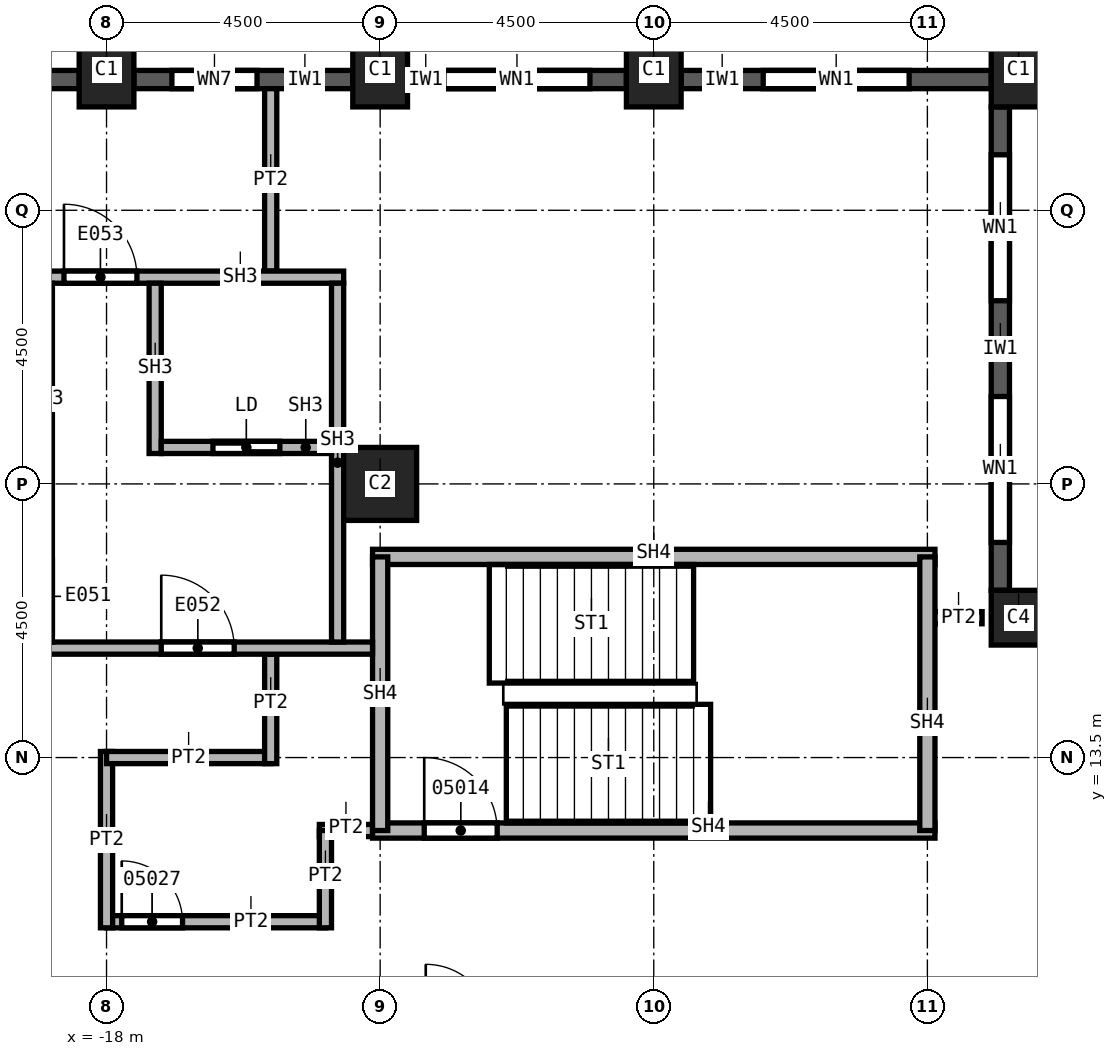
"""IFC4 building model, lengths in metres.
Left out: names, types, materials, properties, quantities, classifications, styles, units other than length and angle.
Written with IfcOpenShell. Run it as: python <this file> out.ifc"""

import sys

from ifc_helpers import new_model, si_unit, direction, frame, frame_2d, origin, origin_2d, place, context, subcontext, project, spatial, rectangle, extrude, element, fill, save


model = new_model("IFC4")
c1 = context("Model", 3, precision=1e-05, world=origin(), true_north=direction((0.0, 1.0)))
c2 = subcontext(c1, "Body", "Model", "MODEL_VIEW")
j1 = project(units=[si_unit("LENGTHUNIT", "METRE"), si_unit("PLANEANGLEUNIT", "RADIAN")], contexts=[c1])
p1 = place(None, origin())
s1 = spatial("IfcSite", under=j1, at=p1, CompositionType="ELEMENT")
p2 = place(p1, origin())
s2 = spatial("IfcBuilding", under=s1, at=p2, CompositionType="ELEMENT")
p3 = place(p2, frame((0.0, 0.0, 112.0)))
s3 = spatial("IfcBuildingStorey", under=s2, at=p3, CompositionType="ELEMENT", Elevation=112.0)
p4 = place(p3, frame((-13.5, 18.0, 0.0), z_axis=(0.0, 0.0, 1.0), x_axis=(1.0, 0.0, 0.0)))
e1 = element("IfcColumn", 1, at=p4, inside=s3, PredefinedType="COLUMN", context=c2, shape_type="SweptSolid", body=[
    extrude(rectangle(XDim=1.2, YDim=1.2, at=origin_2d()), origin(), (0.0, 0.0, 1.0), 3.7),
])
for number, where, z_axis, x_axis in (
    (2, (-3.0, 24.8, 0.0), (0.0, 0.0, 1.0), (1.0, 0.0, 0.0)),
    (3, (-9.0, 24.8, 0.0), (0.0, 0.0, 1.0), (1.0, 0.0, 0.0)),
    (4, (-13.5, 24.8, 0.0), (0.0, 0.0, 1.0), (1.0, 0.0, 0.0)),
    (5, (-18.0, 24.8, 0.0), (0.0, 0.0, 1.0), (1.0, 0.0, 0.0)),
):
    element("IfcColumn", number, at=place(p3, frame(where, z_axis=z_axis, x_axis=x_axis)), inside=s3, PredefinedType="COLUMN", context=c2, shape_type="SweptSolid", body=[
        extrude(rectangle(XDim=0.9, YDim=1.2, at=origin_2d()), origin(), (0.0, 0.0, 1.0), 3.7),
    ])
p5 = place(p3, frame((-3.0, 15.8, 0.0), z_axis=(0.0, 0.0, 1.0), x_axis=(1.0, 0.0, 0.0)))
e6 = element("IfcColumn", 6, at=p5, inside=s3, PredefinedType="COLUMN", context=c2, shape_type="SweptSolid", body=[
    extrude(rectangle(XDim=0.9, YDim=0.9, at=origin_2d()), origin(), (0.0, 0.0, 1.0), 3.7),
])
p6 = place(p3, frame((-3.3, 16.25, 0.0), z_axis=(0.0, 0.0, 1.0), x_axis=(0.0, 1.0, 0.0)))
e7 = element("IfcWall", 7, at=p6, inside=s3, PredefinedType="SOLIDWALL", context=c2, shape_type="SweptSolid", body=[
    extrude(rectangle(XDim=7.95, YDim=0.3, at=frame_2d((3.975, 0.0))), origin(), (0.0, 0.0, 1.0), 3.1),
])
p7 = place(p6, frame((0.788, 0.0, 0.8)))
e8 = element("IfcOpeningElement", 8, at=p7, cuts=e7, PredefinedType="OPENING", context=c2, shape_type="SweptSolid", body=[
    extrude(rectangle(XDim=2.4, YDim=1.95, at=frame_2d((1.2, 0.975))), frame((0.0, 0.15, 0.0), z_axis=(0.0, -1.0, 0.0), x_axis=(1.0, 0.0, 0.0)), (0.0, 0.0, 1.0), 0.3),
])
p8 = place(p6, frame((4.762, 0.0, 0.8)))
e9 = element("IfcOpeningElement", 9, at=p8, cuts=e7, PredefinedType="OPENING", context=c2, shape_type="SweptSolid", body=[
    extrude(rectangle(XDim=2.4, YDim=1.95, at=frame_2d((1.2, 0.975))), frame((0.0, 0.15, 0.0), z_axis=(0.0, -1.0, 0.0), x_axis=(1.0, 0.0, 0.0)), (0.0, 0.0, 1.0), 0.3),
])
p9 = place(p3, frame((-3.45, 24.65, 0.0), z_axis=(0.0, 0.0, 1.0), x_axis=(-1.0, 0.0, 0.0)))
e10 = element("IfcWall", 10, at=p9, inside=s3, PredefinedType="SOLIDWALL", context=c2, shape_type="SweptSolid", body=[
    extrude(rectangle(XDim=5.1, YDim=0.3, at=frame_2d((2.55, 0.0))), origin(), (0.0, 0.0, 1.0), 3.1),
])
p10 = place(p9, frame((1.35, 0.0, 0.8)))
e11 = element("IfcOpeningElement", 11, at=p10, cuts=e10, PredefinedType="OPENING", context=c2, shape_type="SweptSolid", body=[
    extrude(rectangle(XDim=2.4, YDim=1.95, at=frame_2d((1.2, 0.975))), frame((0.0, 0.15, 0.0), z_axis=(0.0, -1.0, 0.0), x_axis=(1.0, 0.0, 0.0)), (0.0, 0.0, 1.0), 0.3),
])
p11 = place(p3, frame((-9.45, 24.65, 0.0), z_axis=(0.0, 0.0, 1.0), x_axis=(-1.0, 0.0, 0.0)))
e12 = element("IfcWall", 12, at=p11, inside=s3, PredefinedType="SOLIDWALL", context=c2, shape_type="SweptSolid", body=[
    extrude(rectangle(XDim=3.6, YDim=0.3, at=frame_2d((1.8, 0.0))), origin(), (0.0, 0.0, 1.0), 3.1),
])
p12 = place(p11, frame((0.6, 0.0, 0.8)))
e13 = element("IfcOpeningElement", 13, at=p12, cuts=e12, PredefinedType="OPENING", context=c2, shape_type="SweptSolid", body=[
    extrude(rectangle(XDim=2.4, YDim=1.95, at=frame_2d((1.2, 0.975))), frame((0.0, 0.15, 0.0), z_axis=(0.0, -1.0, 0.0), x_axis=(1.0, 0.0, 0.0)), (0.0, 0.0, 1.0), 0.3),
])
p13 = place(p3, frame((-13.95, 24.65, 0.0), z_axis=(0.0, 0.0, 1.0), x_axis=(-1.0, 0.0, 0.0)))
e14 = element("IfcWall", 14, at=p13, inside=s3, PredefinedType="SOLIDWALL", context=c2, shape_type="SweptSolid", body=[
    extrude(rectangle(XDim=3.6, YDim=0.3, at=frame_2d((1.8, 0.0))), origin(), (0.0, 0.0, 1.0), 3.1),
])
p14 = place(p13, frame((1.575, 0.0, 0.8)))
e15 = element("IfcOpeningElement", 15, at=p14, cuts=e14, PredefinedType="OPENING", context=c2, shape_type="SweptSolid", body=[
    extrude(rectangle(XDim=1.4, YDim=1.95, at=frame_2d((0.7, 0.975))), frame((0.0, 0.15, 0.0), z_axis=(0.0, -1.0, 0.0), x_axis=(1.0, 0.0, 0.0)), (0.0, 0.0, 1.0), 0.3),
])
p15 = place(p3, frame((-18.45, 24.65, 0.0), z_axis=(0.0, 0.0, 1.0), x_axis=(-1.0, 0.0, 0.0)))
e16 = element("IfcWall", 16, at=p15, inside=s3, PredefinedType="SOLIDWALL", context=c2, shape_type="SweptSolid", body=[
    extrude(rectangle(XDim=3.6, YDim=0.3, at=frame_2d((1.8, 0.0))), origin(), (0.0, 0.0, 1.0), 3.1),
])
p16 = place(p15, frame((0.6, 0.0, 0.8)))
e17 = element("IfcOpeningElement", 17, at=p16, cuts=e16, PredefinedType="OPENING", context=c2, shape_type="SweptSolid", body=[
    extrude(rectangle(XDim=2.4, YDim=1.95, at=frame_2d((1.2, 0.975))), frame((0.0, 0.15, 0.0), z_axis=(0.0, -1.0, 0.0), x_axis=(1.0, 0.0, 0.0)), (0.0, 0.0, 1.0), 0.3),
])
p17 = place(p3, frame((-18.0, 10.8, 0.0), z_axis=(0.0, 0.0, 1.0), x_axis=(1.0, 0.0, 0.0)))
e18 = element("IfcWall", 18, at=p17, inside=s3, PredefinedType="PARTITIONING", context=c2, shape_type="SweptSolid", body=[
    extrude(rectangle(XDim=3.6, YDim=0.2, at=frame_2d((1.8, 0.0))), origin(), (0.0, 0.0, 1.0), 3.7),
])
p18 = place(p17, frame((0.25, 0.0, 0.0)))
e19 = element("IfcOpeningElement", 19, at=p18, cuts=e18, PredefinedType="OPENING", context=c2, shape_type="SweptSolid", body=[
    extrude(rectangle(XDim=1.0, YDim=2.1, at=frame_2d((0.5, 1.05))), frame((0.0, 0.1, 0.0), z_axis=(0.0, -1.0, 0.0), x_axis=(1.0, 0.0, 0.0)), (0.0, 0.0, 1.0), 0.2),
])
p19 = place(p3, frame((-18.0, 13.6, 0.0), z_axis=(0.0, 0.0, 1.0), x_axis=(0.0, -1.0, 0.0)))
e20 = element("IfcWall", 20, at=p19, inside=s3, PredefinedType="PARTITIONING", context=c2, shape_type="SweptSolid", body=[
    extrude(rectangle(XDim=2.9, YDim=0.2, at=frame_2d((1.45, 0.0))), origin(), (0.0, 0.0, 1.0), 3.7),
])
p20 = place(p3, frame((-15.3, 13.5, 0.0), z_axis=(0.0, 0.0, 1.0), x_axis=(-1.0, 0.0, 0.0)))
e21 = element("IfcWall", 21, at=p20, inside=s3, PredefinedType="PARTITIONING", context=c2, shape_type="SweptSolid", body=[
    extrude(rectangle(XDim=2.7, YDim=0.2, at=frame_2d((1.35, 0.0))), origin(), (0.0, 0.0, 1.0), 3.7),
])
p21 = place(p3, frame((-15.3, 15.2, 0.0), z_axis=(0.0, 0.0, 1.0), x_axis=(0.0, -1.0, 0.0)))
e22 = element("IfcWall", 22, at=p21, inside=s3, PredefinedType="PARTITIONING", context=c2, shape_type="SweptSolid", body=[
    extrude(rectangle(XDim=1.8, YDim=0.2, at=frame_2d((0.9, 0.0))), origin(), (0.0, 0.0, 1.0), 3.7),
])
p22 = place(p3, frame((-15.3, 24.5, 0.0), z_axis=(0.0, 0.0, 1.0), x_axis=(0.0, -1.0, 0.0)))
e23 = element("IfcWall", 23, at=p22, inside=s3, PredefinedType="PARTITIONING", context=c2, shape_type="SweptSolid", body=[
    extrude(rectangle(XDim=3.0, YDim=0.2, at=frame_2d((1.5, 0.0))), origin(), (0.0, 0.0, 1.0), 3.7),
])
p23 = place(p3, frame((-14.5, 12.3, 0.0), z_axis=(0.0, 0.0, 1.0), x_axis=(1.0, 0.0, 0.0)))
e24 = element("IfcWall", 24, at=p23, inside=s3, PredefinedType="PARTITIONING", context=c2, shape_type="SweptSolid", body=[
    extrude(rectangle(XDim=1.125, YDim=0.2, at=frame_2d((0.562, 0.0))), origin(), (0.0, 0.0, 1.0), 3.7),
])
p24 = place(p3, frame((-14.4, 10.7, 0.0), z_axis=(0.0, 0.0, 1.0), x_axis=(0.0, 1.0, 0.0)))
e25 = element("IfcWall", 25, at=p24, inside=s3, PredefinedType="PARTITIONING", context=c2, shape_type="SweptSolid", body=[
    extrude(rectangle(XDim=1.6, YDim=0.2, at=frame_2d((0.8, 0.0))), origin(), (0.0, 0.0, 1.0), 3.7),
])
p25 = place(p3, frame((-4.5, 15.8, 0.0), z_axis=(0.0, 0.0, 1.0), x_axis=(1.0, 0.0, 0.0)))
e26 = element("IfcWall", 26, at=p25, inside=s3, PredefinedType="PARTITIONING", context=c2, shape_type="SweptSolid", body=[
    extrude(rectangle(XDim=0.9, YDim=0.2, at=frame_2d((0.45, 0.0))), origin(), (0.0, 0.0, 1.0), 3.7),
])
p26 = place(p3, frame((-13.625, 12.3, 0.0), z_axis=(0.0, 0.0, 1.0), x_axis=(1.0, 0.0, 0.0)))
e27 = element("IfcWall", 27, at=p26, inside=s3, PredefinedType="SOLIDWALL", context=c2, shape_type="SweptSolid", body=[
    extrude(rectangle(XDim=9.25, YDim=0.25, at=frame_2d((4.625, 0.0))), origin(), (0.0, 0.0, 1.0), 3.7),
])
p27 = place(p26, frame((0.85, 0.0, 0.0)))
e28 = element("IfcOpeningElement", 28, at=p27, cuts=e27, PredefinedType="OPENING", context=c2, shape_type="SweptSolid", body=[
    extrude(rectangle(XDim=1.2, YDim=2.1, at=frame_2d((0.6, 1.05))), frame((0.0, 0.125, 0.0), z_axis=(0.0, -1.0, 0.0), x_axis=(1.0, 0.0, 0.0)), (0.0, 0.0, 1.0), 0.25),
])
p28 = place(p3, frame((-13.625, 16.8, 0.0), z_axis=(0.0, 0.0, 1.0), x_axis=(1.0, 0.0, 0.0)))
e29 = element("IfcWall", 29, at=p28, inside=s3, PredefinedType="SOLIDWALL", context=c2, shape_type="SweptSolid", body=[
    extrude(rectangle(XDim=9.25, YDim=0.25, at=frame_2d((4.625, 0.0))), origin(), (0.0, 0.0, 1.0), 3.7),
])
for number, where, z_axis, x_axis in (
    (30, (-13.5, 12.3, 0.0), (0.0, 0.0, 1.0), (0.0, 1.0, 0.0)),
    (31, (-4.5, 16.8, 0.0), (0.0, 0.0, 1.0), (0.0, -1.0, 0.0)),
):
    element("IfcWall", number, at=place(p3, frame(where, z_axis=z_axis, x_axis=x_axis)), inside=s3, PredefinedType="SOLIDWALL", context=c2, shape_type="SweptSolid", body=[
        extrude(rectangle(XDim=4.5, YDim=0.25, at=frame_2d((2.25, 0.0))), origin(), (0.0, 0.0, 1.0), 3.7),
    ])
p29 = place(p3, frame((-21.9, 15.3, 0.0), z_axis=(0.0, 0.0, 1.0), x_axis=(1.0, 0.0, 0.0)))
e32 = element("IfcWall", 32, at=p29, inside=s3, PredefinedType="SOLIDWALL", context=c2, shape_type="SweptSolid", body=[
    extrude(rectangle(XDim=8.275, YDim=0.2, at=frame_2d((4.137, 0.0))), origin(), (0.0, 0.0, 1.0), 3.7),
])
p30 = place(p29, frame((4.8, 0.0, 0.0)))
e33 = element("IfcOpeningElement", 33, at=p30, cuts=e32, PredefinedType="OPENING", context=c2, shape_type="SweptSolid", body=[
    extrude(rectangle(XDim=1.2, YDim=2.1, at=frame_2d((0.6, 1.05))), frame((0.0, 0.1, 0.0), z_axis=(0.0, -1.0, 0.0), x_axis=(1.0, 0.0, 0.0)), (0.0, 0.0, 1.0), 0.2),
])
p31 = place(p3, frame((-21.9, 21.4, 0.0), z_axis=(0.0, 0.0, 1.0), x_axis=(1.0, 0.0, 0.0)))
e34 = element("IfcWall", 34, at=p31, inside=s3, PredefinedType="SOLIDWALL", context=c2, shape_type="SweptSolid", body=[
    extrude(rectangle(XDim=7.8, YDim=0.2, at=frame_2d((3.9, 0.0))), origin(), (0.0, 0.0, 1.0), 3.7),
])
p32 = place(p31, frame((3.2, 0.0, 0.0)))
e35 = element("IfcOpeningElement", 35, at=p32, cuts=e34, PredefinedType="OPENING", context=c2, shape_type="SweptSolid", body=[
    extrude(rectangle(XDim=1.2, YDim=2.1, at=frame_2d((0.6, 1.05))), frame((0.0, 0.1, 0.0), z_axis=(0.0, -1.0, 0.0), x_axis=(1.0, 0.0, 0.0)), (0.0, 0.0, 1.0), 0.2),
])
p33 = place(p3, frame((-14.2, 15.4, 0.0), z_axis=(0.0, 0.0, 1.0), x_axis=(0.0, 1.0, 0.0)))
e36 = element("IfcWall", 36, at=p33, inside=s3, PredefinedType="SOLIDWALL", context=c2, shape_type="SweptSolid", body=[
    extrude(rectangle(XDim=5.9, YDim=0.2, at=frame_2d((2.95, 0.0))), origin(), (0.0, 0.0, 1.0), 3.7),
])
p34 = place(p3, frame((-18.99, 15.4, 0.0), z_axis=(0.0, 0.0, 1.0), x_axis=(0.0, 1.0, 0.0)))
e37 = element("IfcWall", 37, at=p34, inside=s3, PredefinedType="SOLIDWALL", context=c2, shape_type="SweptSolid", body=[
    extrude(rectangle(XDim=5.9, YDim=0.2, at=frame_2d((2.95, 0.0))), origin(), (0.0, 0.0, 1.0), 3.7),
])
p35 = place(p34, frame((0.15, 0.0, 0.0)))
e38 = element("IfcOpeningElement", 38, at=p35, cuts=e37, PredefinedType="OPENING", context=c2, shape_type="SweptSolid", body=[
    extrude(rectangle(XDim=1.2, YDim=2.1, at=frame_2d((0.6, 1.05))), frame((0.0, 0.1, 0.0), z_axis=(0.0, -1.0, 0.0), x_axis=(1.0, 0.0, 0.0)), (0.0, 0.0, 1.0), 0.2),
])
p36 = place(p3, frame((-17.2, 18.5, 0.0), z_axis=(0.0, 0.0, 1.0), x_axis=(0.0, 1.0, 0.0)))
e39 = element("IfcWall", 39, at=p36, inside=s3, PredefinedType="SOLIDWALL", context=c2, shape_type="SweptSolid", body=[
    extrude(rectangle(XDim=2.8, YDim=0.2, at=frame_2d((1.4, 0.0))), origin(), (0.0, 0.0, 1.0), 3.7),
])
p37 = place(p3, frame((-17.1, 18.6, 0.0), z_axis=(0.0, 0.0, 1.0), x_axis=(1.0, 0.0, 0.0)))
e40 = element("IfcWall", 40, at=p37, inside=s3, PredefinedType="SOLIDWALL", context=c2, shape_type="SweptSolid", body=[
    extrude(rectangle(XDim=2.8, YDim=0.2, at=frame_2d((1.4, 0.0))), origin(), (0.0, 0.0, 1.0), 3.7),
])
p38 = place(p37, frame((0.85, 0.0, 0.0)))
e41 = element("IfcOpeningElement", 41, at=p38, cuts=e40, PredefinedType="OPENING", context=c2, shape_type="SweptSolid", body=[
    extrude(rectangle(XDim=1.1, YDim=2.1, at=frame_2d((0.55, 1.05))), frame((0.0, 0.1, 0.0), z_axis=(0.0, -1.0, 0.0), x_axis=(1.0, 0.0, 0.0)), (0.0, 0.0, 1.0), 0.2),
])
p39 = place(p7, origin())
e42 = element("IfcWindow", 42, at=p39, inside=s3, PartitioningType="SINGLE_PANEL", PredefinedType="WINDOW", context=c2, shape_type="SweptSolid", body=[
    extrude(rectangle(XDim=2.4, YDim=1.95, at=frame_2d((1.2, 0.975))), frame((0.0, 0.03, 0.0), z_axis=(0.0, -1.0, 0.0), x_axis=(1.0, 0.0, 0.0)), (0.0, 0.0, 1.0), 0.06),
])
fill(e8, e42)
p40 = place(p8, origin())
e43 = element("IfcWindow", 43, at=p40, inside=s3, PartitioningType="SINGLE_PANEL", PredefinedType="WINDOW", context=c2, shape_type="SweptSolid", body=[
    extrude(rectangle(XDim=2.4, YDim=1.95, at=frame_2d((1.2, 0.975))), frame((0.0, 0.03, 0.0), z_axis=(0.0, -1.0, 0.0), x_axis=(1.0, 0.0, 0.0)), (0.0, 0.0, 1.0), 0.06),
])
fill(e9, e43)
p41 = place(p10, origin())
e44 = element("IfcWindow", 44, at=p41, inside=s3, PartitioningType="SINGLE_PANEL", PredefinedType="WINDOW", context=c2, shape_type="SweptSolid", body=[
    extrude(rectangle(XDim=2.4, YDim=1.95, at=frame_2d((1.2, 0.975))), frame((0.0, 0.03, 0.0), z_axis=(0.0, -1.0, 0.0), x_axis=(1.0, 0.0, 0.0)), (0.0, 0.0, 1.0), 0.06),
])
fill(e11, e44)
p42 = place(p12, origin())
e45 = element("IfcWindow", 45, at=p42, inside=s3, PartitioningType="SINGLE_PANEL", PredefinedType="WINDOW", context=c2, shape_type="SweptSolid", body=[
    extrude(rectangle(XDim=2.4, YDim=1.95, at=frame_2d((1.2, 0.975))), frame((0.0, 0.03, 0.0), z_axis=(0.0, -1.0, 0.0), x_axis=(1.0, 0.0, 0.0)), (0.0, 0.0, 1.0), 0.06),
])
fill(e13, e45)
p43 = place(p27, origin())
e46 = element("IfcDoor", 46, at=p43, inside=s3, OperationType="SINGLE_SWING_LEFT", PredefinedType="DOOR", context=c2, shape_type="SweptSolid", body=[
    extrude(rectangle(XDim=1.2, YDim=2.1, at=frame_2d((0.6, 1.05))), frame((0.0, 0.025, 0.0), z_axis=(0.0, -1.0, 0.0), x_axis=(1.0, 0.0, 0.0)), (0.0, 0.0, 1.0), 0.05),
])
fill(e28, e46)
p44 = place(p18, origin())
e47 = element("IfcDoor", 47, at=p44, inside=s3, OperationType="SINGLE_SWING_RIGHT", PredefinedType="DOOR", context=c2, shape_type="SweptSolid", body=[
    extrude(rectangle(XDim=1.0, YDim=2.1, at=frame_2d((0.5, 1.05))), frame((0.0, 0.025, 0.0), z_axis=(0.0, -1.0, 0.0), x_axis=(1.0, 0.0, 0.0)), (0.0, 0.0, 1.0), 0.05),
])
fill(e19, e47)
p45 = place(p38, origin())
e48 = element("IfcDoor", 48, at=p45, inside=s3, OperationType="SLIDING_TO_LEFT", PredefinedType="DOOR", context=c2, shape_type="SweptSolid", body=[
    extrude(rectangle(XDim=1.1, YDim=2.1, at=frame_2d((0.55, 1.05))), frame((0.0, 0.025, 0.0), z_axis=(0.0, -1.0, 0.0), x_axis=(1.0, 0.0, 0.0)), (0.0, 0.0, 1.0), 0.05),
])
fill(e41, e48)
p46 = place(p30, origin())
e49 = element("IfcDoor", 49, at=p46, inside=s3, OperationType="SINGLE_SWING_RIGHT", PredefinedType="DOOR", context=c2, shape_type="SweptSolid", body=[
    extrude(rectangle(XDim=1.2, YDim=2.1, at=frame_2d((0.6, 1.05))), frame((0.0, 0.025, 0.0), z_axis=(0.0, -1.0, 0.0), x_axis=(1.0, 0.0, 0.0)), (0.0, 0.0, 1.0), 0.05),
])
fill(e33, e49)
p47 = place(p32, origin())
e50 = element("IfcDoor", 50, at=p47, inside=s3, OperationType="SINGLE_SWING_LEFT", PredefinedType="DOOR", context=c2, shape_type="SweptSolid", body=[
    extrude(rectangle(XDim=1.2, YDim=2.1, at=frame_2d((0.6, 1.05))), frame((0.0, 0.025, 0.0), z_axis=(0.0, -1.0, 0.0), x_axis=(1.0, 0.0, 0.0)), (0.0, 0.0, 1.0), 0.05),
])
fill(e35, e50)
p48 = place(p14, origin())
e51 = element("IfcWindow", 51, at=p48, inside=s3, PartitioningType="SINGLE_PANEL", PredefinedType="WINDOW", context=c2, shape_type="SweptSolid", body=[
    extrude(rectangle(XDim=1.4, YDim=1.95, at=frame_2d((0.7, 0.975))), frame((0.0, 0.03, 0.0), z_axis=(0.0, -1.0, 0.0), x_axis=(1.0, 0.0, 0.0)), (0.0, 0.0, 1.0), 0.06),
])
fill(e15, e51)
save(model, sys.argv[1])
